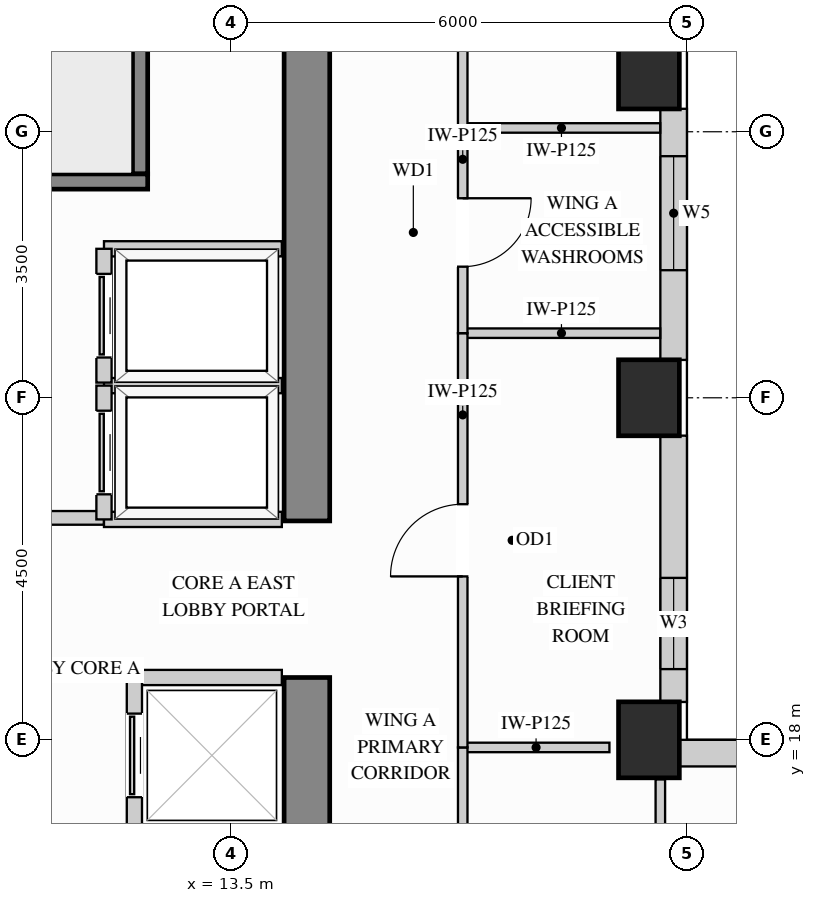
"""IFC4 building model, lengths in metres.
Left out: names, types, materials, properties, quantities, classifications, styles, units other than length and angle.
Written with IfcOpenShell. Run it as: python <this file> out.ifc"""

import sys

from ifc_helpers import new_model, si_unit, direction, frame, frame_2d, origin, origin_2d, place, context, subcontext, project, spatial, rectangle, extrude, source, transform, mapped, element, fill, save


model = new_model("IFC4")
c1 = context("Model", 3, precision=1e-05, world=origin(), true_north=direction((0.0, 1.0)))
c2 = subcontext(c1, "Body", "Model", "MODEL_VIEW")
j1 = project(units=[si_unit("LENGTHUNIT", "METRE"), si_unit("PLANEANGLEUNIT", "RADIAN")], contexts=[c1])
p1 = place(None, origin())
s1 = spatial("IfcSite", under=j1, at=p1, CompositionType="ELEMENT")
p2 = place(p1, origin())
s2 = spatial("IfcBuilding", under=s1, at=p2, CompositionType="ELEMENT")
p3 = place(p2, frame((0.0, 0.0, 171.9)))
s3 = spatial("IfcBuildingStorey", under=s2, at=p3, CompositionType="ELEMENT", Elevation=171.9)
m1 = source(origin(), c2, "Body", "SweptSolid", [
    extrude(rectangle(XDim=0.8, YDim=1.0, at=origin_2d()), origin(), (0.0, 0.0, 1.0), 3.4),
])
for number, where, z_axis, x_axis in (
    (1, (19.0, 18.0, 0.0), (0.0, 0.0, 1.0), (1.0, 0.0, 0.0)),
    (2, (19.0, 22.5, 0.0), (0.0, 0.0, 1.0), (1.0, 0.0, 0.0)),
    (3, (19.0, 26.8, 0.0), (0.0, 0.0, 1.0), (1.0, 0.0, 0.0)),
):
    element("IfcColumn", number, at=place(p3, frame(where, z_axis=z_axis, x_axis=x_axis)), inside=s3, PredefinedType="COLUMN", context=c2, shape_type="MappedRepresentation", body=[
        mapped(m1, transform((0.0, 0.0, 0.0), x_axis=(1.0, 0.0, 0.0), y_axis=(0.0, 1.0, 0.0), z_axis=(0.0, 0.0, 1.0))),
    ])
m2 = source(origin(), c2, "Body", "SweptSolid", [
    extrude(rectangle(XDim=10.02, YDim=0.6, at=frame_2d((5.01, 0.0))), origin(), (0.0, 0.0, 1.0), 3.4),
])
p4 = place(p3, frame((14.5, 8.8, 0.0), z_axis=(0.0, 0.0, 1.0), x_axis=(0.0, 1.0, 0.0)))
e4 = element("IfcWall", 4, at=p4, inside=s3, PredefinedType="SHEAR", context=c2, shape_type="MappedRepresentation", body=[
    mapped(m2, transform((0.0, 0.0, 0.0), x_axis=(1.0, 0.0, 0.0), y_axis=(0.0, 1.0, 0.0), z_axis=(0.0, 0.0, 1.0))),
])
m3 = source(origin(), c2, "Body", "SweptSolid", [
    extrude(rectangle(XDim=8.32, YDim=0.6, at=frame_2d((4.16, 0.0))), origin(), (0.0, 0.0, 1.0), 3.4),
])
p5 = place(p3, frame((14.5, 20.88, 0.0), z_axis=(0.0, 0.0, 1.0), x_axis=(0.0, 1.0, 0.0)))
e5 = element("IfcWall", 5, at=p5, inside=s3, PredefinedType="SHEAR", context=c2, shape_type="MappedRepresentation", body=[
    mapped(m3, transform((0.0, 0.0, 0.0), x_axis=(1.0, 0.0, 0.0), y_axis=(0.0, 1.0, 0.0), z_axis=(0.0, 0.0, 1.0))),
])
p6 = place(p3, frame((34.502, 17.825, 0.0), z_axis=(0.0, 0.0, 1.0), x_axis=(-1.0, 0.0, 0.0)))
e6 = element("IfcWall", 6, at=p6, inside=s3, PredefinedType="SOLIDWALL", context=c2, shape_type="SweptSolid", body=[
    extrude(rectangle(XDim=15.104, YDim=0.35, at=frame_2d((7.552, 0.0))), origin(), (0.0, 0.0, 1.0), 3.385),
])
p7 = place(p6, frame((4.131, 0.0, 0.78)))
e7 = element("IfcOpeningElement", 7, at=p7, cuts=e6, PredefinedType="OPENING", context=c2, shape_type="SweptSolid", body=[
    extrude(rectangle(XDim=1.5, YDim=2.0, at=frame_2d((0.75, 1.0))), frame((0.0, 0.185, 0.0), z_axis=(0.0, -1.0, 0.0), x_axis=(1.0, 0.0, 0.0)), (0.0, 0.0, 1.0), 0.37),
])
p8 = place(p6, frame((9.442, 0.0, 0.78)))
e8 = element("IfcOpeningElement", 8, at=p8, cuts=e6, PredefinedType="OPENING", context=c2, shape_type="SweptSolid", body=[
    extrude(rectangle(XDim=1.5, YDim=2.0, at=frame_2d((0.75, 1.0))), frame((0.0, 0.185, 0.0), z_axis=(0.0, -1.0, 0.0), x_axis=(1.0, 0.0, 0.0)), (0.0, 0.0, 1.0), 0.37),
])
p9 = place(p3, frame((19.325, 18.498, 0.0), z_axis=(0.0, 0.0, 1.0), x_axis=(0.0, 1.0, 0.0)))
e9 = element("IfcWall", 9, at=p9, inside=s3, PredefinedType="SOLIDWALL", context=c2, shape_type="SweptSolid", body=[
    extrude(rectangle(XDim=3.504, YDim=0.35, at=frame_2d((1.752, 0.0))), origin(), (0.0, 0.0, 1.0), 2.612),
])
p10 = place(p9, frame((0.433, 0.0, 0.78)))
e10 = element("IfcOpeningElement", 10, at=p10, cuts=e9, PredefinedType="OPENING", context=c2, shape_type="SweptSolid", body=[
    extrude(rectangle(XDim=1.2, YDim=1.652, at=frame_2d((0.6, 0.826))), frame((0.0, 0.185, 0.0), z_axis=(0.0, -1.0, 0.0), x_axis=(1.0, 0.0, 0.0)), (0.0, 0.0, 1.0), 0.37),
])
p11 = place(p3, frame((19.325, 22.998, 0.0), z_axis=(0.0, 0.0, 1.0), x_axis=(0.0, 1.0, 0.0)))
e11 = element("IfcWall", 11, at=p11, inside=s3, PredefinedType="SOLIDWALL", context=c2, shape_type="SweptSolid", body=[
    extrude(rectangle(XDim=3.304, YDim=0.35, at=frame_2d((1.652, 0.0))), origin(), (0.0, 0.0, 1.0), 2.612),
])
p12 = place(p11, frame((1.18, 0.0, 0.78)))
e12 = element("IfcOpeningElement", 12, at=p12, cuts=e11, PredefinedType="OPENING", context=c2, shape_type="SweptSolid", body=[
    extrude(rectangle(XDim=1.5, YDim=1.652, at=frame_2d((0.75, 0.826))), frame((0.0, 0.185, 0.0), z_axis=(0.0, -1.0, 0.0), x_axis=(1.0, 0.0, 0.0)), (0.0, 0.0, 1.0), 0.37),
])
p13 = place(p3, frame((7.15, 20.92, 0.0), z_axis=(0.0, 0.0, 1.0), x_axis=(1.0, 0.0, 0.0)))
e13 = element("IfcWall", 13, at=p13, inside=s3, PredefinedType="PARTITIONING", context=c2, shape_type="SweptSolid", body=[
    extrude(rectangle(XDim=4.68, YDim=0.18, at=frame_2d((2.34, 0.0))), origin(), (0.0, 0.0, 1.0), 3.385),
])
p14 = place(p13, frame((2.2, 0.0, 0.0)))
e14 = element("IfcOpeningElement", 14, at=p14, cuts=e13, PredefinedType="OPENING", context=c2, shape_type="SweptSolid", body=[
    extrude(rectangle(XDim=1.1, YDim=2.15, at=frame_2d((0.55, 1.075))), frame((0.0, 0.1, 0.0), z_axis=(0.0, -1.0, 0.0), x_axis=(1.0, 0.0, 0.0)), (0.0, 0.0, 1.0), 0.2),
])
m4 = source(origin(), c2, "Body", "SweptSolid", [
    extrude(rectangle(XDim=1.93, YDim=0.125, at=frame_2d((0.965, 0.0))), origin(), (0.0, 0.0, 1.0), 2.773),
])
p15 = place(p3, frame((16.55, 17.9, 0.0), z_axis=(0.0, 0.0, 1.0), x_axis=(1.0, 0.0, 0.0)))
e15 = element("IfcWall", 15, at=p15, inside=s3, PredefinedType="PARTITIONING", context=c2, shape_type="MappedRepresentation", body=[
    mapped(m4, transform((0.0, 0.0, 0.0), x_axis=(1.0, 0.0, 0.0), y_axis=(0.0, 1.0, 0.0), z_axis=(0.0, 0.0, 1.0))),
])
m5 = source(origin(), c2, "Body", "SweptSolid", [
    extrude(rectangle(XDim=2.598, YDim=0.125, at=frame_2d((1.299, 0.0))), origin(), (0.0, 0.0, 1.0), 3.385),
])
for number, where, z_axis, x_axis in (
    (16, (16.55, 23.35, 0.0), (0.0, 0.0, 1.0), (1.0, 0.0, 0.0)),
    (17, (16.55, 26.05, 0.0), (0.0, 0.0, 1.0), (1.0, 0.0, 0.0)),
):
    element("IfcWall", number, at=place(p3, frame(where, z_axis=z_axis, x_axis=x_axis)), inside=s3, PredefinedType="PARTITIONING", context=c2, shape_type="MappedRepresentation", body=[
        mapped(m5, transform((0.0, 0.0, 0.0), x_axis=(1.0, 0.0, 0.0), y_axis=(0.0, 1.0, 0.0), z_axis=(0.0, 0.0, 1.0))),
    ])
m6 = source(origin(), c2, "Body", "SweptSolid", [
    extrude(rectangle(XDim=3.46, YDim=0.125, at=frame_2d((1.73, 0.0))), origin(), (0.0, 0.0, 1.0), 2.773),
])
p16 = place(p3, frame((19.15, 14.02, 0.0), z_axis=(0.0, 0.0, 1.0), x_axis=(0.0, 1.0, 0.0)))
e18 = element("IfcWall", 18, at=p16, inside=s3, PredefinedType="PARTITIONING", context=c2, shape_type="MappedRepresentation", body=[
    mapped(m6, transform((0.0, 0.0, 0.0), x_axis=(1.0, 0.0, 0.0), y_axis=(0.0, 1.0, 0.0), z_axis=(0.0, 0.0, 1.0))),
])
p17 = place(p3, frame((16.55, 12.35, 0.0), z_axis=(0.0, 0.0, 1.0), x_axis=(0.0, 1.0, 0.0)))
e19 = element("IfcWall", 19, at=p17, inside=s3, PredefinedType="PARTITIONING", context=c2, shape_type="SweptSolid", body=[
    extrude(rectangle(XDim=5.55, YDim=0.125, at=frame_2d((2.775, 0.0))), origin(), (0.0, 0.0, 1.0), 3.385),
])
p18 = place(p17, frame((2.3, 0.0, 0.0)))
e20 = element("IfcOpeningElement", 20, at=p18, cuts=e19, PredefinedType="OPENING", context=c2, shape_type="SweptSolid", body=[
    extrude(rectangle(XDim=0.95, YDim=2.15, at=frame_2d((0.475, 1.075))), frame((0.0, 0.073, 0.0), z_axis=(0.0, -1.0, 0.0), x_axis=(1.0, 0.0, 0.0)), (0.0, 0.0, 1.0), 0.145),
])
p19 = place(p3, frame((16.55, 17.9, 0.0), z_axis=(0.0, 0.0, 1.0), x_axis=(0.0, 1.0, 0.0)))
e21 = element("IfcWall", 21, at=p19, inside=s3, PredefinedType="PARTITIONING", context=c2, shape_type="SweptSolid", body=[
    extrude(rectangle(XDim=5.45, YDim=0.125, at=frame_2d((2.725, 0.0))), origin(), (0.0, 0.0, 1.0), 3.385),
])
p20 = place(p19, frame((2.25, 0.0, 0.0)))
e22 = element("IfcOpeningElement", 22, at=p20, cuts=e21, PredefinedType="OPENING", context=c2, shape_type="SweptSolid", body=[
    extrude(rectangle(XDim=0.95, YDim=2.15, at=frame_2d((0.475, 1.075))), frame((0.0, 0.073, 0.0), z_axis=(0.0, -1.0, 0.0), x_axis=(1.0, 0.0, 0.0)), (0.0, 0.0, 1.0), 0.145),
])
p21 = place(p3, frame((16.55, 26.05, 0.0), z_axis=(0.0, 0.0, 1.0), x_axis=(0.0, 1.0, 0.0)))
e23 = element("IfcWall", 23, at=p21, inside=s3, PredefinedType="PARTITIONING", context=c2, shape_type="SweptSolid", body=[
    extrude(rectangle(XDim=6.3, YDim=0.125, at=frame_2d((3.15, 0.0))), origin(), (0.0, 0.0, 1.0), 3.385),
])
p22 = place(p21, frame((2.675, 0.0, 0.0)))
e24 = element("IfcOpeningElement", 24, at=p22, cuts=e23, PredefinedType="OPENING", context=c2, shape_type="SweptSolid", body=[
    extrude(rectangle(XDim=0.95, YDim=2.15, at=frame_2d((0.475, 1.075))), frame((0.0, 0.073, 0.0), z_axis=(0.0, -1.0, 0.0), x_axis=(1.0, 0.0, 0.0)), (0.0, 0.0, 1.0), 0.145),
])
p23 = place(p3, frame((16.55, 23.35, 0.0), z_axis=(0.0, 0.0, 1.0), x_axis=(0.0, 1.0, 0.0)))
e25 = element("IfcWall", 25, at=p23, inside=s3, PredefinedType="PARTITIONING", context=c2, shape_type="SweptSolid", body=[
    extrude(rectangle(XDim=2.7, YDim=0.125, at=frame_2d((1.35, 0.0))), origin(), (0.0, 0.0, 1.0), 3.385),
])
p24 = place(p23, frame((0.875, 0.0, 0.0)))
e26 = element("IfcOpeningElement", 26, at=p24, cuts=e25, PredefinedType="OPENING", context=c2, shape_type="SweptSolid", body=[
    extrude(rectangle(XDim=0.9, YDim=2.15, at=frame_2d((0.45, 1.075))), frame((0.0, 0.073, 0.0), z_axis=(0.0, -1.0, 0.0), x_axis=(1.0, 0.0, 0.0)), (0.0, 0.0, 1.0), 0.145),
])
m7 = source(origin(), c2, "Body", "SweptSolid", [
    extrude(rectangle(XDim=2.34, YDim=0.2, at=frame_2d((1.17, 0.0))), origin(), (0.0, 0.0, 1.0), 3.385),
])
for number, where, z_axis, x_axis in (
    (27, (11.83, 22.66, 0.0), (0.0, 0.0, 1.0), (1.0, 0.0, 0.0)),
    (28, (11.83, 20.9, 0.0), (0.0, 0.0, 1.0), (1.0, 0.0, 0.0)),
):
    element("IfcWall", number, at=place(p3, frame(where, z_axis=z_axis, x_axis=x_axis)), inside=s3, PredefinedType="PARTITIONING", context=c2, shape_type="MappedRepresentation", body=[
        mapped(m7, transform((0.0, 0.0, 0.0), x_axis=(1.0, 0.0, 0.0), y_axis=(0.0, 1.0, 0.0), z_axis=(0.0, 0.0, 1.0))),
    ])
p25 = place(p3, frame((11.83, 20.9, 0.0), z_axis=(0.0, 0.0, 1.0), x_axis=(0.0, 1.0, 0.0)))
e29 = element("IfcWall", 29, at=p25, inside=s3, PredefinedType="PARTITIONING", context=c2, shape_type="SweptSolid", body=[
    extrude(rectangle(XDim=1.76, YDim=0.2, at=frame_2d((0.88, 0.0))), origin(), (0.0, 0.0, 1.0), 3.385),
])
p26 = place(p25, frame((0.33, 0.0, 0.0)))
e30 = element("IfcOpeningElement", 30, at=p26, cuts=e29, PredefinedType="OPENING", context=c2, shape_type="SweptSolid", body=[
    extrude(rectangle(XDim=1.1, YDim=2.2, at=frame_2d((0.55, 1.1))), frame((0.0, 0.11, 0.0), z_axis=(0.0, -1.0, 0.0), x_axis=(1.0, 0.0, 0.0)), (0.0, 0.0, 1.0), 0.22),
])
p27 = place(p3, frame((11.83, 24.46, 0.0), z_axis=(0.0, 0.0, 1.0), x_axis=(1.0, 0.0, 0.0)))
e31 = element("IfcWall", 31, at=p27, inside=s3, PredefinedType="PARTITIONING", context=c2, shape_type="MappedRepresentation", body=[
    mapped(m7, transform((0.0, 0.0, 0.0), x_axis=(1.0, 0.0, 0.0), y_axis=(0.0, 1.0, 0.0), z_axis=(0.0, 0.0, 1.0))),
])
p28 = place(p3, frame((11.83, 22.7, 0.0), z_axis=(0.0, 0.0, 1.0), x_axis=(0.0, 1.0, 0.0)))
e32 = element("IfcWall", 32, at=p28, inside=s3, PredefinedType="PARTITIONING", context=c2, shape_type="SweptSolid", body=[
    extrude(rectangle(XDim=1.76, YDim=0.2, at=frame_2d((0.88, 0.0))), origin(), (0.0, 0.0, 1.0), 3.385),
])
p29 = place(p28, frame((0.33, 0.0, 0.0)))
e33 = element("IfcOpeningElement", 33, at=p29, cuts=e32, PredefinedType="OPENING", context=c2, shape_type="SweptSolid", body=[
    extrude(rectangle(XDim=1.1, YDim=2.2, at=frame_2d((0.55, 1.1))), frame((0.0, 0.11, 0.0), z_axis=(0.0, -1.0, 0.0), x_axis=(1.0, 0.0, 0.0)), (0.0, 0.0, 1.0), 0.22),
])
m8 = source(origin(), c2, "Body", "SweptSolid", [
    extrude(rectangle(XDim=1.94, YDim=0.2, at=frame_2d((0.97, 0.0))), origin(), (0.0, 0.0, 1.0), 3.385),
])
p30 = place(p3, frame((12.23, 18.82, 0.0), z_axis=(0.0, 0.0, 1.0), x_axis=(1.0, 0.0, 0.0)))
e34 = element("IfcWall", 34, at=p30, inside=s3, PredefinedType="PARTITIONING", context=c2, shape_type="MappedRepresentation", body=[
    mapped(m8, transform((0.0, 0.0, 0.0), x_axis=(1.0, 0.0, 0.0), y_axis=(0.0, 1.0, 0.0), z_axis=(0.0, 0.0, 1.0))),
])
p31 = place(p3, frame((12.23, 16.77, 0.0), z_axis=(0.0, 0.0, 1.0), x_axis=(0.0, 1.0, 0.0)))
e35 = element("IfcWall", 35, at=p31, inside=s3, PredefinedType="PARTITIONING", context=c2, shape_type="SweptSolid", body=[
    extrude(rectangle(XDim=2.05, YDim=0.2, at=frame_2d((1.025, 0.0))), origin(), (0.0, 0.0, 1.0), 3.385),
])
p32 = place(p31, frame((0.475, 0.0, 0.0)))
e36 = element("IfcOpeningElement", 36, at=p32, cuts=e35, PredefinedType="OPENING", context=c2, shape_type="SweptSolid", body=[
    extrude(rectangle(XDim=1.1, YDim=2.2, at=frame_2d((0.55, 1.1))), frame((0.0, 0.11, 0.0), z_axis=(0.0, -1.0, 0.0), x_axis=(1.0, 0.0, 0.0)), (0.0, 0.0, 1.0), 0.22),
])
m9 = source(origin(), c2, "Body", "SweptSolid", [
    extrude(rectangle(XDim=3.753, YDim=0.2, at=frame_2d((1.876, 0.0))), origin(), (0.0, 0.0, 1.0), 3.4),
])
p33 = place(p3, frame((12.305, 25.445, 0.0), z_axis=(0.0, 0.0, 1.0), x_axis=(0.0, 1.0, 0.0)))
e37 = element("IfcWall", 37, at=p33, inside=s3, PredefinedType="SHEAR", context=c2, shape_type="MappedRepresentation", body=[
    mapped(m9, transform((0.0, 0.0, 0.0), x_axis=(1.0, 0.0, 0.0), y_axis=(0.0, 1.0, 0.0), z_axis=(0.0, 0.0, 1.0))),
])
p34 = place(p3, frame((4.802, 25.345, 0.0), z_axis=(0.0, 0.0, 1.0), x_axis=(1.0, 0.0, 0.0)))
e38 = element("IfcWall", 38, at=p34, inside=s3, PredefinedType="SHEAR", context=c2, shape_type="SweptSolid", body=[
    extrude(rectangle(XDim=7.603, YDim=0.2, at=frame_2d((3.802, 0.0))), origin(), (0.0, 0.0, 1.0), 3.4),
])
p35 = place(p34, frame((0.4, 0.0, 0.0)))
e39 = element("IfcOpeningElement", 39, at=p35, cuts=e38, PredefinedType="OPENING", context=c2, shape_type="SweptSolid", body=[
    extrude(rectangle(XDim=1.1, YDim=2.15, at=frame_2d((0.55, 1.075))), frame((0.0, 0.11, 0.0), z_axis=(0.0, -1.0, 0.0), x_axis=(1.0, 0.0, 0.0)), (0.0, 0.0, 1.0), 0.22),
])
m10 = source(origin(), c2, "Body", "SweptSolid", [
    extrude(rectangle(XDim=1.1, YDim=2.2, at=frame_2d((0.55, 1.1))), frame((0.0, 0.025, 0.0), z_axis=(0.0, -1.0, 0.0), x_axis=(1.0, 0.0, 0.0)), (0.0, 0.0, 1.0), 0.05),
])
p36 = place(p26, origin())
e40 = element("IfcDoor", 40, at=p36, inside=s3, OperationType="SLIDING_TO_LEFT", PredefinedType="DOOR", context=c2, shape_type="MappedRepresentation", body=[
    mapped(m10, transform((0.0, 0.0, 0.0), x_axis=(1.0, 0.0, 0.0), y_axis=(0.0, 1.0, 0.0), z_axis=(0.0, 0.0, 1.0))),
])
fill(e30, e40)
p37 = place(p29, origin())
e41 = element("IfcDoor", 41, at=p37, inside=s3, OperationType="SLIDING_TO_LEFT", PredefinedType="DOOR", context=c2, shape_type="MappedRepresentation", body=[
    mapped(m10, transform((0.0, 0.0, 0.0), x_axis=(1.0, 0.0, 0.0), y_axis=(0.0, 1.0, 0.0), z_axis=(0.0, 0.0, 1.0))),
])
fill(e33, e41)
p38 = place(p32, origin())
e42 = element("IfcDoor", 42, at=p38, inside=s3, OperationType="SLIDING_TO_LEFT", PredefinedType="DOOR", context=c2, shape_type="MappedRepresentation", body=[
    mapped(m10, transform((0.0, 0.0, 0.0), x_axis=(1.0, 0.0, 0.0), y_axis=(0.0, 1.0, 0.0), z_axis=(0.0, 0.0, 1.0))),
])
fill(e36, e42)
m11 = source(origin(), c2, "Body", "SweptSolid", [
    extrude(rectangle(XDim=0.95, YDim=2.15, at=frame_2d((0.475, 1.075))), frame((0.0, 0.025, 0.0), z_axis=(0.0, -1.0, 0.0), x_axis=(1.0, 0.0, 0.0)), (0.0, 0.0, 1.0), 0.05),
])
p39 = place(p20, origin())
e43 = element("IfcDoor", 43, at=p39, inside=s3, OperationType="SINGLE_SWING_LEFT", PredefinedType="DOOR", context=c2, shape_type="MappedRepresentation", body=[
    mapped(m11, transform((0.0, 0.0, 0.0), x_axis=(1.0, 0.0, 0.0), y_axis=(0.0, 1.0, 0.0), z_axis=(0.0, 0.0, 1.0))),
])
fill(e22, e43)
m12 = source(origin(), c2, "Body", "SweptSolid", [
    extrude(rectangle(XDim=0.9, YDim=2.15, at=frame_2d((0.45, 1.075))), frame((0.0, 0.025, 0.0), z_axis=(0.0, -1.0, 0.0), x_axis=(1.0, 0.0, 0.0)), (0.0, 0.0, 1.0), 0.05),
])
p40 = place(p24, origin())
e44 = element("IfcDoor", 44, at=p40, inside=s3, OperationType="SINGLE_SWING_RIGHT", PredefinedType="DOOR", context=c2, shape_type="MappedRepresentation", body=[
    mapped(m12, transform((0.0, 0.0, 0.0), x_axis=(1.0, 0.0, 0.0), y_axis=(0.0, 1.0, 0.0), z_axis=(0.0, 0.0, 1.0))),
])
fill(e26, e44)
m13 = source(origin(), c2, "Body", "SweptSolid", [
    extrude(rectangle(XDim=1.2, YDim=1.652, at=frame_2d((0.6, 0.826))), frame((0.0, 0.03, 0.0), z_axis=(0.0, -1.0, 0.0), x_axis=(1.0, 0.0, 0.0)), (0.0, 0.0, 1.0), 0.06),
])
p41 = place(p10, origin())
e45 = element("IfcWindow", 45, at=p41, inside=s3, PartitioningType="SINGLE_PANEL", PredefinedType="WINDOW", context=c2, shape_type="MappedRepresentation", body=[
    mapped(m13, transform((0.0, 0.0, 0.0), x_axis=(1.0, 0.0, 0.0), y_axis=(0.0, 1.0, 0.0), z_axis=(0.0, 0.0, 1.0))),
])
fill(e10, e45)
m14 = source(origin(), c2, "Body", "SweptSolid", [
    extrude(rectangle(XDim=1.5, YDim=1.652, at=frame_2d((0.75, 0.826))), frame((0.0, 0.03, 0.0), z_axis=(0.0, -1.0, 0.0), x_axis=(1.0, 0.0, 0.0)), (0.0, 0.0, 1.0), 0.06),
])
p42 = place(p12, origin())
e46 = element("IfcWindow", 46, at=p42, inside=s3, PartitioningType="SINGLE_PANEL", PredefinedType="WINDOW", context=c2, shape_type="MappedRepresentation", body=[
    mapped(m14, transform((0.0, 0.0, 0.0), x_axis=(1.0, 0.0, 0.0), y_axis=(0.0, 1.0, 0.0), z_axis=(0.0, 0.0, 1.0))),
])
fill(e12, e46)
save(model, sys.argv[1])
